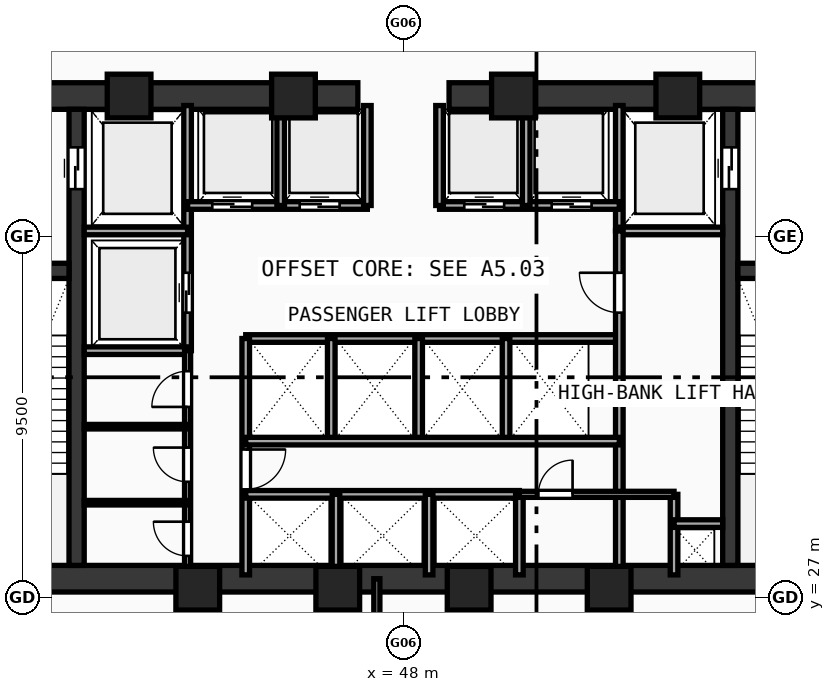
"""IFC4 building model, lengths in metres.
Left out: names, types, materials, properties, quantities, classifications, styles, units other than length and angle.
Written with IfcOpenShell. Run it as: python <this file> out.ifc"""

import sys

from ifc_helpers import new_model, si_unit, direction, frame, frame_2d, origin, origin_with_axes, origin_2d, place, context, subcontext, project, spatial, rectangle, hollow_rectangle, extrude, source, transform, mapped, element, fill, save


model = new_model("IFC4")
c1 = context("Model", 3, precision=1e-05, world=origin(), true_north=direction((0.0, 1.0)))
c2 = subcontext(c1, "Body", "Model", "MODEL_VIEW")
j1 = project(units=[si_unit("LENGTHUNIT", "METRE"), si_unit("PLANEANGLEUNIT", "RADIAN")], contexts=[c1])
p1 = place(None, origin())
s1 = spatial("IfcSite", under=j1, at=p1, CompositionType="ELEMENT")
p2 = place(p1, origin())
s2 = spatial("IfcBuilding", under=s1, at=p2, CompositionType="ELEMENT")
p3 = place(p2, frame((0.0, 0.0, 14.4)))
s3 = spatial("IfcBuildingStorey", under=s2, at=p3, CompositionType="ELEMENT", Elevation=14.4)
p4 = place(p3, frame((35.45, 27.5, 0.0), z_axis=(0.0, 0.0, 1.0), x_axis=(1.0, 0.0, 0.0)))
e1 = element("IfcWall", 1, at=p4, inside=s3, PredefinedType="SHEAR", context=c2, shape_type="SweptSolid", body=[
    extrude(rectangle(XDim=25.1, YDim=0.7, at=frame_2d((12.55, 0.0))), origin(), (0.0, 0.0, 1.0), 4.52),
])
p5 = place(p3, frame((35.45, 40.2, 0.0), z_axis=(0.0, 0.0, 1.0), x_axis=(1.0, 0.0, 0.0)))
e2 = element("IfcWall", 2, at=p5, inside=s3, PredefinedType="SHEAR", context=c2, shape_type="SweptSolid", body=[
    extrude(rectangle(XDim=11.35, YDim=0.7, at=frame_2d((5.675, 0.0))), origin(), (0.0, 0.0, 1.0), 4.52),
])
p6 = place(p5, frame((1.7, 0.0, 0.0)))
e3 = element("IfcOpeningElement", 3, at=p6, cuts=e2, PredefinedType="OPENING", context=c2, shape_type="SweptSolid", body=[
    extrude(rectangle(XDim=1.05, YDim=2.1, at=frame_2d((0.525, 1.05))), frame((0.0, 0.36, 0.0), z_axis=(0.0, -1.0, 0.0), x_axis=(1.0, 0.0, 0.0)), (0.0, 0.0, 1.0), 0.72),
])
p7 = place(p3, frame((49.2, 40.2, 0.0), z_axis=(0.0, 0.0, 1.0), x_axis=(1.0, 0.0, 0.0)))
e4 = element("IfcWall", 4, at=p7, inside=s3, PredefinedType="SHEAR", context=c2, shape_type="SweptSolid", body=[
    extrude(rectangle(XDim=11.35, YDim=0.7, at=frame_2d((5.675, 0.0))), origin(), (0.0, 0.0, 1.0), 4.52),
])
p8 = place(p7, frame((8.6, 0.0, 0.0)))
e5 = element("IfcOpeningElement", 5, at=p8, cuts=e4, PredefinedType="OPENING", context=c2, shape_type="SweptSolid", body=[
    extrude(rectangle(XDim=1.05, YDim=2.1, at=frame_2d((0.525, 1.05))), frame((0.0, 0.36, 0.0), z_axis=(0.0, -1.0, 0.0), x_axis=(1.0, 0.0, 0.0)), (0.0, 0.0, 1.0), 0.72),
])
p9 = place(p3, frame((39.4, 27.85, 0.0), z_axis=(0.0, 0.0, 1.0), x_axis=(0.0, 1.0, 0.0)))
e6 = element("IfcWall", 6, at=p9, inside=s3, PredefinedType="SHEAR", context=c2, shape_type="SweptSolid", body=[
    extrude(rectangle(XDim=12.0, YDim=0.4, at=frame_2d((6.0, 0.0))), origin(), (0.0, 0.0, 1.0), 4.52),
])
p10 = place(p9, frame((9.9, 0.0, 0.0)))
e7 = element("IfcOpeningElement", 7, at=p10, cuts=e6, PredefinedType="OPENING", context=c2, shape_type="SweptSolid", body=[
    extrude(rectangle(XDim=1.1, YDim=2.1, at=frame_2d((0.55, 1.05))), frame((0.0, 0.21, 0.0), z_axis=(0.0, -1.0, 0.0), x_axis=(1.0, 0.0, 0.0)), (0.0, 0.0, 1.0), 0.42),
])
p11 = place(p3, frame((56.6, 27.85, 0.0), z_axis=(0.0, 0.0, 1.0), x_axis=(0.0, 1.0, 0.0)))
e8 = element("IfcWall", 8, at=p11, inside=s3, PredefinedType="SHEAR", context=c2, shape_type="SweptSolid", body=[
    extrude(rectangle(XDim=12.0, YDim=0.4, at=frame_2d((6.0, 0.0))), origin(), (0.0, 0.0, 1.0), 4.52),
])
p12 = place(p11, frame((9.9, 0.0, 0.0)))
e9 = element("IfcOpeningElement", 9, at=p12, cuts=e8, PredefinedType="OPENING", context=c2, shape_type="SweptSolid", body=[
    extrude(rectangle(XDim=1.1, YDim=2.1, at=frame_2d((0.55, 1.05))), frame((0.0, 0.21, 0.0), z_axis=(0.0, -1.0, 0.0), x_axis=(1.0, 0.0, 0.0)), (0.0, 0.0, 1.0), 0.42),
])
p13 = place(p3, frame((36.15, 35.6, 0.0), z_axis=(0.0, 0.0, 1.0), x_axis=(1.0, 0.0, 0.0)))
e10 = element("IfcWall", 10, at=p13, inside=s3, PredefinedType="SHEAR", context=c2, shape_type="SweptSolid", body=[
    extrude(rectangle(XDim=3.05, YDim=0.4, at=frame_2d((1.525, 0.0))), origin(), (0.0, 0.0, 1.0), 4.52),
])
p14 = place(p13, frame((0.97, 0.0, 0.0)))
e11 = element("IfcOpeningElement", 11, at=p14, cuts=e10, PredefinedType="OPENING", context=c2, shape_type="SweptSolid", body=[
    extrude(rectangle(XDim=1.05, YDim=2.1, at=frame_2d((0.525, 1.05))), frame((0.0, 0.21, 0.0), z_axis=(0.0, -1.0, 0.0), x_axis=(1.0, 0.0, 0.0)), (0.0, 0.0, 1.0), 0.42),
])
p15 = place(p3, frame((56.8, 35.6, 0.0), z_axis=(0.0, 0.0, 1.0), x_axis=(1.0, 0.0, 0.0)))
e12 = element("IfcWall", 12, at=p15, inside=s3, PredefinedType="SHEAR", context=c2, shape_type="SweptSolid", body=[
    extrude(rectangle(XDim=3.05, YDim=0.4, at=frame_2d((1.525, 0.0))), origin(), (0.0, 0.0, 1.0), 4.52),
])
p16 = place(p15, frame((1.02, 0.0, 0.0)))
e13 = element("IfcOpeningElement", 13, at=p16, cuts=e12, PredefinedType="OPENING", context=c2, shape_type="SweptSolid", body=[
    extrude(rectangle(XDim=1.05, YDim=2.1, at=frame_2d((0.525, 1.05))), frame((0.0, 0.21, 0.0), z_axis=(0.0, -1.0, 0.0), x_axis=(1.0, 0.0, 0.0)), (0.0, 0.0, 1.0), 0.42),
])
m1 = source(origin(), c2, "Body", "SweptSolid", [
    extrude(hollow_rectangle(XDim=1.15, YDim=1.15, WallThickness=0.048, at=origin_2d()), origin(), (0.0, 0.0, 1.0), 4.8),
])
for number, where, z_axis, x_axis in (
    (14, (42.588, 27.25, -0.28), (0.0, 0.0, 1.0), (1.0, 0.0, 0.0)),
    (15, (46.272, 27.25, -0.28), (0.0, 0.0, 1.0), (1.0, 0.0, 0.0)),
    (16, (49.729, 27.25, -0.28), (0.0, 0.0, 1.0), (1.0, 0.0, 0.0)),
    (17, (53.412, 27.25, -0.28), (0.0, 0.0, 1.0), (1.0, 0.0, 0.0)),
    (18, (55.219, 40.2, -0.28), (0.0, 0.0, 1.0), (1.0, 0.0, 0.0)),
    (19, (50.894, 40.2, -0.28), (0.0, 0.0, 1.0), (1.0, 0.0, 0.0)),
    (20, (45.106, 40.2, -0.28), (0.0, 0.0, 1.0), (1.0, 0.0, 0.0)),
    (21, (40.781, 40.2, -0.28), (0.0, 0.0, 1.0), (1.0, 0.0, 0.0)),
):
    element("IfcColumn", number, at=place(p3, frame(where, z_axis=z_axis, x_axis=x_axis)), inside=s3, PredefinedType="COLUMN", context=c2, shape_type="MappedRepresentation", body=[
        mapped(m1, transform((0.0, 0.0, 0.0), scale=1.0)),
    ])
p17 = place(p3, frame((42.32, 33.5, 0.0), z_axis=(0.0, 0.0, 1.0), x_axis=(0.0, 1.0, 0.0)))
e22 = element("IfcWall", 22, at=p17, inside=s3, PredefinedType="SOLIDWALL", context=c2, shape_type="SweptSolid", body=[
    extrude(rectangle(XDim=6.45, YDim=0.2, at=frame_2d((3.225, 0.0))), origin(), (0.0, 0.0, 1.0), 4.52),
])
p18 = place(p17, frame((1.0, 0.0, 0.0)))
e23 = element("IfcOpeningElement", 23, at=p18, cuts=e22, PredefinedType="OPENING", context=c2, shape_type="SweptSolid", body=[
    extrude(rectangle(XDim=1.05, YDim=2.1, at=frame_2d((0.525, 1.05))), frame((0.0, 0.11, 0.0), z_axis=(0.0, -1.0, 0.0), x_axis=(1.0, 0.0, 0.0)), (0.0, 0.0, 1.0), 0.22),
])
for number, where, z_axis, x_axis in (
    (24, (39.6, 36.65, 0.0), (0.0, 0.0, 1.0), (1.0, 0.0, 0.0)),
    (25, (39.6, 33.5, 0.0), (0.0, 0.0, 1.0), (1.0, 0.0, 0.0)),
):
    element("IfcWall", number, at=place(p3, frame(where, z_axis=z_axis, x_axis=x_axis)), inside=s3, PredefinedType="SOLIDWALL", context=c2, shape_type="SweptSolid", body=[
        extrude(rectangle(XDim=2.72, YDim=0.2, at=frame_2d((1.36, 0.0))), origin(), (0.0, 0.0, 1.0), 4.52),
    ])
p19 = place(p3, frame((53.68, 36.65, 0.0), z_axis=(0.0, 0.0, 1.0), x_axis=(0.0, 1.0, 0.0)))
e26 = element("IfcWall", 26, at=p19, inside=s3, PredefinedType="SOLIDWALL", context=c2, shape_type="SweptSolid", body=[
    extrude(rectangle(XDim=3.3, YDim=0.2, at=frame_2d((1.65, 0.0))), origin(), (0.0, 0.0, 1.0), 4.52),
])
p20 = place(p3, frame((53.68, 36.65, 0.0), z_axis=(0.0, 0.0, 1.0), x_axis=(1.0, 0.0, 0.0)))
e27 = element("IfcWall", 27, at=p20, inside=s3, PredefinedType="SOLIDWALL", context=c2, shape_type="SweptSolid", body=[
    extrude(rectangle(XDim=2.72, YDim=0.2, at=frame_2d((1.36, 0.0))), origin(), (0.0, 0.0, 1.0), 4.52),
])
p21 = place(p3, frame((42.32, 37.32, 0.0), z_axis=(0.0, 0.0, 1.0), x_axis=(1.0, 0.0, 0.0)))
e28 = element("IfcWall", 28, at=p21, inside=s3, PredefinedType="SOLIDWALL", context=c2, shape_type="SweptSolid", body=[
    extrude(rectangle(XDim=4.73, YDim=0.2, at=frame_2d((2.365, 0.0))), origin(), (0.0, 0.0, 1.0), 4.52),
])
p22 = place(p21, frame((0.65, 0.0, 0.0)))
e29 = element("IfcOpeningElement", 29, at=p22, cuts=e28, PredefinedType="OPENING", context=c2, shape_type="SweptSolid", body=[
    extrude(rectangle(XDim=1.05, YDim=2.1, at=frame_2d((0.525, 1.05))), frame((0.0, 0.11, 0.0), z_axis=(0.0, -1.0, 0.0), x_axis=(1.0, 0.0, 0.0)), (0.0, 0.0, 1.0), 0.22),
])
p23 = place(p21, frame((2.95, 0.0, 0.0)))
e30 = element("IfcOpeningElement", 30, at=p23, cuts=e28, PredefinedType="OPENING", context=c2, shape_type="SweptSolid", body=[
    extrude(rectangle(XDim=1.05, YDim=2.1, at=frame_2d((0.525, 1.05))), frame((0.0, 0.11, 0.0), z_axis=(0.0, -1.0, 0.0), x_axis=(1.0, 0.0, 0.0)), (0.0, 0.0, 1.0), 0.22),
])
p24 = place(p3, frame((48.95, 37.32, 0.0), z_axis=(0.0, 0.0, 1.0), x_axis=(1.0, 0.0, 0.0)))
e31 = element("IfcWall", 31, at=p24, inside=s3, PredefinedType="SOLIDWALL", context=c2, shape_type="SweptSolid", body=[
    extrude(rectangle(XDim=4.73, YDim=0.2, at=frame_2d((2.365, 0.0))), origin(), (0.0, 0.0, 1.0), 4.52),
])
p25 = place(p24, frame((0.65, 0.0, 0.0)))
e32 = element("IfcOpeningElement", 32, at=p25, cuts=e31, PredefinedType="OPENING", context=c2, shape_type="SweptSolid", body=[
    extrude(rectangle(XDim=1.05, YDim=2.1, at=frame_2d((0.525, 1.05))), frame((0.0, 0.11, 0.0), z_axis=(0.0, -1.0, 0.0), x_axis=(1.0, 0.0, 0.0)), (0.0, 0.0, 1.0), 0.22),
])
p26 = place(p24, frame((2.95, 0.0, 0.0)))
e33 = element("IfcOpeningElement", 33, at=p26, cuts=e31, PredefinedType="OPENING", context=c2, shape_type="SweptSolid", body=[
    extrude(rectangle(XDim=1.05, YDim=2.1, at=frame_2d((0.525, 1.05))), frame((0.0, 0.11, 0.0), z_axis=(0.0, -1.0, 0.0), x_axis=(1.0, 0.0, 0.0)), (0.0, 0.0, 1.0), 0.22),
])
for number, where, z_axis, x_axis in (
    (34, (47.05, 37.32, 0.0), (0.0, 0.0, 1.0), (0.0, 1.0, 0.0)),
    (35, (48.95, 37.32, 0.0), (0.0, 0.0, 1.0), (0.0, 1.0, 0.0)),
    (36, (44.77, 37.32, 0.0), (0.0, 0.0, 1.0), (0.0, 1.0, 0.0)),
    (37, (51.23, 37.32, 0.0), (0.0, 0.0, 1.0), (0.0, 1.0, 0.0)),
):
    element("IfcWall", number, at=place(p3, frame(where, z_axis=z_axis, x_axis=x_axis)), inside=s3, PredefinedType="SOLIDWALL", context=c2, shape_type="SweptSolid", body=[
        extrude(rectangle(XDim=2.63, YDim=0.2, at=frame_2d((1.315, 0.0))), origin(), (0.0, 0.0, 1.0), 4.52),
    ])
p27 = place(p3, frame((43.85, 33.82, 0.0), z_axis=(0.0, 0.0, 1.0), x_axis=(1.0, 0.0, 0.0)))
e38 = element("IfcWall", 38, at=p27, inside=s3, PredefinedType="SOLIDWALL", context=c2, shape_type="SweptSolid", body=[
    extrude(rectangle(XDim=9.83, YDim=0.2, at=frame_2d((4.915, 0.0))), origin(), (0.0, 0.0, 1.0), 4.52),
])
p28 = place(p3, frame((43.85, 27.6, 0.0), z_axis=(0.0, 0.0, 1.0), x_axis=(0.0, 1.0, 0.0)))
e39 = element("IfcWall", 39, at=p28, inside=s3, PredefinedType="SOLIDWALL", context=c2, shape_type="SweptSolid", body=[
    extrude(rectangle(XDim=6.22, YDim=0.2, at=frame_2d((3.11, 0.0))), origin(), (0.0, 0.0, 1.0), 4.52),
])
p29 = place(p28, frame((2.25, 0.0, 0.0)))
e40 = element("IfcOpeningElement", 40, at=p29, cuts=e39, PredefinedType="OPENING", context=c2, shape_type="SweptSolid", body=[
    extrude(rectangle(XDim=1.05, YDim=2.1, at=frame_2d((0.525, 1.05))), frame((0.0, 0.11, 0.0), z_axis=(0.0, -1.0, 0.0), x_axis=(1.0, 0.0, 0.0)), (0.0, 0.0, 1.0), 0.22),
])
p30 = place(p3, frame((53.68, 27.6, 0.0), z_axis=(0.0, 0.0, 1.0), x_axis=(0.0, 1.0, 0.0)))
e41 = element("IfcWall", 41, at=p30, inside=s3, PredefinedType="SOLIDWALL", context=c2, shape_type="SweptSolid", body=[
    extrude(rectangle(XDim=9.05, YDim=0.2, at=frame_2d((4.525, 0.0))), origin(), (0.0, 0.0, 1.0), 4.52),
])
p31 = place(p30, frame((6.9, 0.0, 0.0)))
e42 = element("IfcOpeningElement", 42, at=p31, cuts=e41, PredefinedType="OPENING", context=c2, shape_type="SweptSolid", body=[
    extrude(rectangle(XDim=1.05, YDim=2.1, at=frame_2d((0.525, 1.05))), frame((0.0, 0.11, 0.0), z_axis=(0.0, -1.0, 0.0), x_axis=(1.0, 0.0, 0.0)), (0.0, 0.0, 1.0), 0.22),
])
for number, where, z_axis, x_axis in (
    (43, (46.1, 31.12, 0.0), (0.0, 0.0, 1.0), (0.0, 1.0, 0.0)),
    (44, (48.4, 31.12, 0.0), (0.0, 0.0, 1.0), (0.0, 1.0, 0.0)),
    (45, (50.7, 31.12, 0.0), (0.0, 0.0, 1.0), (0.0, 1.0, 0.0)),
):
    element("IfcWall", number, at=place(p3, frame(where, z_axis=z_axis, x_axis=x_axis)), inside=s3, PredefinedType="SOLIDWALL", context=c2, shape_type="SweptSolid", body=[
        extrude(rectangle(XDim=2.7, YDim=0.2, at=frame_2d((1.35, 0.0))), origin(), (0.0, 0.0, 1.0), 4.52),
    ])
p32 = place(p3, frame((43.85, 29.72, 0.0), z_axis=(0.0, 0.0, 1.0), x_axis=(1.0, 0.0, 0.0)))
e46 = element("IfcWall", 46, at=p32, inside=s3, PredefinedType="SOLIDWALL", context=c2, shape_type="SweptSolid", body=[
    extrude(rectangle(XDim=7.2, YDim=0.2, at=frame_2d((3.6, 0.0))), origin(), (0.0, 0.0, 1.0), 4.52),
])
p33 = place(p3, frame((51.05, 27.6, 0.0), z_axis=(0.0, 0.0, 1.0), x_axis=(0.0, 1.0, 0.0)))
e47 = element("IfcWall", 47, at=p33, inside=s3, PredefinedType="SOLIDWALL", context=c2, shape_type="SweptSolid", body=[
    extrude(rectangle(XDim=2.12, YDim=0.2, at=frame_2d((1.06, 0.0))), origin(), (0.0, 0.0, 1.0), 4.52),
])
p34 = place(p3, frame((43.85, 31.12, 0.0), z_axis=(0.0, 0.0, 1.0), x_axis=(1.0, 0.0, 0.0)))
e48 = element("IfcWall", 48, at=p34, inside=s3, PredefinedType="SOLIDWALL", context=c2, shape_type="SweptSolid", body=[
    extrude(rectangle(XDim=9.83, YDim=0.2, at=frame_2d((4.915, 0.0))), origin(), (0.0, 0.0, 1.0), 4.52),
])
for number, where, z_axis, x_axis in (
    (49, (46.225, 27.6, 0.0), (0.0, 0.0, 1.0), (0.0, 1.0, 0.0)),
    (50, (48.675, 27.6, 0.0), (0.0, 0.0, 1.0), (0.0, 1.0, 0.0)),
    (51, (55.12, 27.6, 0.0), (0.0, 0.0, 1.0), (0.0, 1.0, 0.0)),
):
    element("IfcWall", number, at=place(p3, frame(where, z_axis=z_axis, x_axis=x_axis)), inside=s3, PredefinedType="SOLIDWALL", context=c2, shape_type="SweptSolid", body=[
        extrude(rectangle(XDim=2.12, YDim=0.2, at=frame_2d((1.06, 0.0))), origin(), (0.0, 0.0, 1.0), 4.52),
    ])
p35 = place(p3, frame((55.12, 28.95, 0.0), z_axis=(0.0, 0.0, 1.0), x_axis=(1.0, 0.0, 0.0)))
e52 = element("IfcWall", 52, at=p35, inside=s3, PredefinedType="SOLIDWALL", context=c2, shape_type="SweptSolid", body=[
    extrude(rectangle(XDim=1.28, YDim=0.2, at=frame_2d((0.64, 0.0))), origin(), (0.0, 0.0, 1.0), 4.52),
])
p36 = place(p3, frame((42.32, 27.6, 0.0), z_axis=(0.0, 0.0, 1.0), x_axis=(0.0, 1.0, 0.0)))
e53 = element("IfcWall", 53, at=p36, inside=s3, PredefinedType="PARTITIONING", context=c2, shape_type="SweptSolid", body=[
    extrude(rectangle(XDim=5.9, YDim=0.16, at=frame_2d((2.95, 0.0))), origin(), (0.0, 0.0, 1.0), 4.52),
])
p37 = place(p36, frame((0.5, 0.0, 0.0)))
e54 = element("IfcOpeningElement", 54, at=p37, cuts=e53, PredefinedType="OPENING", context=c2, shape_type="SweptSolid", body=[
    extrude(rectangle(XDim=0.9, YDim=2.1, at=frame_2d((0.45, 1.05))), frame((0.0, 0.09, 0.0), z_axis=(0.0, -1.0, 0.0), x_axis=(1.0, 0.0, 0.0)), (0.0, 0.0, 1.0), 0.18),
])
p38 = place(p36, frame((2.45, 0.0, 0.0)))
e55 = element("IfcOpeningElement", 55, at=p38, cuts=e53, PredefinedType="OPENING", context=c2, shape_type="SweptSolid", body=[
    extrude(rectangle(XDim=0.9, YDim=2.1, at=frame_2d((0.45, 1.05))), frame((0.0, 0.09, 0.0), z_axis=(0.0, -1.0, 0.0), x_axis=(1.0, 0.0, 0.0)), (0.0, 0.0, 1.0), 0.18),
])
p39 = place(p36, frame((4.42, 0.0, 0.0)))
e56 = element("IfcOpeningElement", 56, at=p39, cuts=e53, PredefinedType="OPENING", context=c2, shape_type="SweptSolid", body=[
    extrude(rectangle(XDim=0.94, YDim=2.1, at=frame_2d((0.47, 1.05))), frame((0.0, 0.09, 0.0), z_axis=(0.0, -1.0, 0.0), x_axis=(1.0, 0.0, 0.0)), (0.0, 0.0, 1.0), 0.18),
])
p40 = place(p3, frame((51.05, 29.72, 0.0), z_axis=(0.0, 0.0, 1.0), x_axis=(1.0, 0.0, 0.0)))
e57 = element("IfcWall", 57, at=p40, inside=s3, PredefinedType="PARTITIONING", context=c2, shape_type="SweptSolid", body=[
    extrude(rectangle(XDim=4.07, YDim=0.16, at=frame_2d((2.035, 0.0))), origin(), (0.0, 0.0, 1.0), 4.52),
])
p41 = place(p40, frame((0.5, 0.0, 0.0)))
e58 = element("IfcOpeningElement", 58, at=p41, cuts=e57, PredefinedType="OPENING", context=c2, shape_type="SweptSolid", body=[
    extrude(rectangle(XDim=0.9, YDim=2.1, at=frame_2d((0.45, 1.05))), frame((0.0, 0.09, 0.0), z_axis=(0.0, -1.0, 0.0), x_axis=(1.0, 0.0, 0.0)), (0.0, 0.0, 1.0), 0.18),
])
for number, where, z_axis, x_axis in (
    (59, (39.6, 29.5, 0.0), (0.0, 0.0, 1.0), (1.0, 0.0, 0.0)),
    (60, (39.6, 31.5, 0.0), (0.0, 0.0, 1.0), (1.0, 0.0, 0.0)),
):
    element("IfcWall", number, at=place(p3, frame(where, z_axis=z_axis, x_axis=x_axis)), inside=s3, PredefinedType="PARTITIONING", context=c2, shape_type="SweptSolid", body=[
        extrude(rectangle(XDim=2.72, YDim=0.12, at=frame_2d((1.36, 0.0))), origin(), (0.0, 0.0, 1.0), 4.52),
    ])
p42 = place(p3, frame((47.3, 12.45, 0.0), z_axis=(0.0, 0.0, 1.0), x_axis=(0.0, 1.0, 0.0)))
e61 = element("IfcWall", 61, at=p42, inside=s3, PredefinedType="PARTITIONING", context=c2, shape_type="SweptSolid", body=[
    extrude(rectangle(XDim=15.05, YDim=0.16, at=frame_2d((7.525, 0.0))), origin(), (0.0, 0.0, 1.0), 3.62),
])
p43 = place(p3, frame((45.0, 34.4, 0.0), z_axis=(0.0, 0.0, 1.0), x_axis=(1.0, 0.0, 0.0)))
e62 = element("IfcWall", 62, at=p43, inside=s3, PredefinedType="MOVABLE", context=c2, shape_type="SweptSolid", body=[
    extrude(rectangle(XDim=6.0, YDim=0.11, at=frame_2d((3.0, 0.0))), origin(), (0.0, 0.0, 1.0), 2.5),
])
m2 = source(origin(), c2, "Body", "SweptSolid", [
    extrude(rectangle(XDim=1.1, YDim=2.1, at=frame_2d((0.55, 1.05))), frame((0.0, 0.025, 0.0), z_axis=(0.0, -1.0, 0.0), x_axis=(1.0, 0.0, 0.0)), (0.0, 0.0, 1.0), 0.05),
])
p44 = place(p10, frame((1.1, 0.0, 0.0), z_axis=(0.0, 0.0, 1.0), x_axis=(-1.0, 0.0, 0.0)))
e63 = element("IfcDoor", 63, at=p44, inside=s3, OperationType="DOUBLE_DOOR_SLIDING", PredefinedType="DOOR", context=c2, shape_type="MappedRepresentation", body=[
    mapped(m2, transform((0.0, 0.0, 0.0), scale=1.0)),
])
fill(e7, e63)
p45 = place(p12, origin_with_axes())
e64 = element("IfcDoor", 64, at=p45, inside=s3, OperationType="DOUBLE_DOOR_SLIDING", PredefinedType="DOOR", context=c2, shape_type="MappedRepresentation", body=[
    mapped(m2, transform((0.0, 0.0, 0.0), scale=1.0)),
])
fill(e9, e64)
m3 = source(origin(), c2, "Body", "SweptSolid", [
    extrude(rectangle(XDim=1.05, YDim=2.1, at=frame_2d((0.525, 1.05))), frame((0.0, 0.025, 0.0), z_axis=(0.0, -1.0, 0.0), x_axis=(1.0, 0.0, 0.0)), (0.0, 0.0, 1.0), 0.05),
])
p46 = place(p18, origin_with_axes())
e65 = element("IfcDoor", 65, at=p46, inside=s3, OperationType="DOUBLE_DOOR_SLIDING", PredefinedType="DOOR", context=c2, shape_type="MappedRepresentation", body=[
    mapped(m3, transform((0.0, 0.0, 0.0), scale=1.0)),
])
fill(e23, e65)
p47 = place(p22, frame((1.05, 0.0, 0.0), z_axis=(0.0, 0.0, 1.0), x_axis=(-1.0, 0.0, 0.0)))
e66 = element("IfcDoor", 66, at=p47, inside=s3, OperationType="DOUBLE_DOOR_SLIDING", PredefinedType="DOOR", context=c2, shape_type="MappedRepresentation", body=[
    mapped(m3, transform((0.0, 0.0, 0.0), scale=1.0)),
])
fill(e29, e66)
p48 = place(p23, frame((1.05, 0.0, 0.0), z_axis=(0.0, 0.0, 1.0), x_axis=(-1.0, 0.0, 0.0)))
e67 = element("IfcDoor", 67, at=p48, inside=s3, OperationType="DOUBLE_DOOR_SLIDING", PredefinedType="DOOR", context=c2, shape_type="MappedRepresentation", body=[
    mapped(m3, transform((0.0, 0.0, 0.0), scale=1.0)),
])
fill(e30, e67)
p49 = place(p25, frame((1.05, 0.0, 0.0), z_axis=(0.0, 0.0, 1.0), x_axis=(-1.0, 0.0, 0.0)))
e68 = element("IfcDoor", 68, at=p49, inside=s3, OperationType="DOUBLE_DOOR_SLIDING", PredefinedType="DOOR", context=c2, shape_type="MappedRepresentation", body=[
    mapped(m3, transform((0.0, 0.0, 0.0), scale=1.0)),
])
fill(e32, e68)
p50 = place(p26, frame((1.05, 0.0, 0.0), z_axis=(0.0, 0.0, 1.0), x_axis=(-1.0, 0.0, 0.0)))
e69 = element("IfcDoor", 69, at=p50, inside=s3, OperationType="DOUBLE_DOOR_SLIDING", PredefinedType="DOOR", context=c2, shape_type="MappedRepresentation", body=[
    mapped(m3, transform((0.0, 0.0, 0.0), scale=1.0)),
])
fill(e33, e69)
p51 = place(p29, frame((1.05, 0.0, 0.0), z_axis=(0.0, 0.0, 1.0), x_axis=(-1.0, 0.0, 0.0)))
e70 = element("IfcDoor", 70, at=p51, inside=s3, OperationType="SINGLE_SWING_LEFT", PredefinedType="DOOR", context=c2, shape_type="MappedRepresentation", body=[
    mapped(m3, transform((0.0, 0.0, 0.0), scale=1.0)),
])
fill(e40, e70)
p52 = place(p31, origin_with_axes())
e71 = element("IfcDoor", 71, at=p52, inside=s3, OperationType="SINGLE_SWING_RIGHT", PredefinedType="DOOR", context=c2, shape_type="MappedRepresentation", body=[
    mapped(m3, transform((0.0, 0.0, 0.0), scale=1.0)),
])
fill(e42, e71)
m4 = source(origin(), c2, "Body", "SweptSolid", [
    extrude(rectangle(XDim=0.9, YDim=2.1, at=frame_2d((0.45, 1.05))), frame((0.0, 0.025, 0.0), z_axis=(0.0, -1.0, 0.0), x_axis=(1.0, 0.0, 0.0)), (0.0, 0.0, 1.0), 0.05),
])
p53 = place(p37, origin_with_axes())
e72 = element("IfcDoor", 72, at=p53, inside=s3, OperationType="SINGLE_SWING_RIGHT", PredefinedType="DOOR", context=c2, shape_type="MappedRepresentation", body=[
    mapped(m4, transform((0.0, 0.0, 0.0), scale=1.0)),
])
fill(e54, e72)
p54 = place(p38, origin_with_axes())
e73 = element("IfcDoor", 73, at=p54, inside=s3, OperationType="SINGLE_SWING_RIGHT", PredefinedType="DOOR", context=c2, shape_type="MappedRepresentation", body=[
    mapped(m4, transform((0.0, 0.0, 0.0), scale=1.0)),
])
fill(e55, e73)
m5 = source(origin(), c2, "Body", "SweptSolid", [
    extrude(rectangle(XDim=0.94, YDim=2.1, at=frame_2d((0.47, 1.05))), frame((0.0, 0.025, 0.0), z_axis=(0.0, -1.0, 0.0), x_axis=(1.0, 0.0, 0.0)), (0.0, 0.0, 1.0), 0.05),
])
p55 = place(p39, origin_with_axes())
e74 = element("IfcDoor", 74, at=p55, inside=s3, OperationType="SINGLE_SWING_LEFT", PredefinedType="DOOR", context=c2, shape_type="MappedRepresentation", body=[
    mapped(m5, transform((0.0, 0.0, 0.0), scale=1.0)),
])
fill(e56, e74)
p56 = place(p41, origin_with_axes())
e75 = element("IfcDoor", 75, at=p56, inside=s3, OperationType="SINGLE_SWING_RIGHT", PredefinedType="DOOR", context=c2, shape_type="MappedRepresentation", body=[
    mapped(m4, transform((0.0, 0.0, 0.0), scale=1.0)),
])
fill(e58, e75)
save(model, sys.argv[1])
